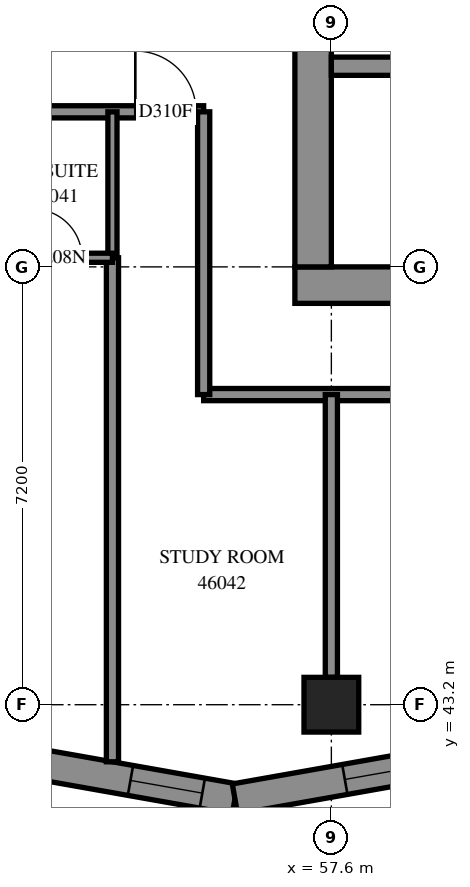
"""IFC4 building model, lengths in metres.
Left out: names, types, materials, properties, quantities, classifications, styles, units other than length and angle.
Written with IfcOpenShell. Run it as: python <this file> out.ifc"""

import sys

from ifc_helpers import new_model, si_unit, direction, frame, frame_2d, origin, origin_2d, place, context, subcontext, project, spatial, polyline, rectangle, outline, extrude, element, fill, save


model = new_model("IFC4")
c1 = context("Model", 3, precision=1e-05, world=origin(), true_north=direction((0.0, 1.0)))
c2 = subcontext(c1, "Body", "Model", "MODEL_VIEW")
j1 = project(units=[si_unit("LENGTHUNIT", "METRE"), si_unit("PLANEANGLEUNIT", "RADIAN")], contexts=[c1])
p1 = place(None, origin())
s1 = spatial("IfcSite", under=j1, at=p1, CompositionType="ELEMENT")
p2 = place(p1, origin())
s2 = spatial("IfcBuilding", under=s1, at=p2, CompositionType="ELEMENT")
p3 = place(p2, frame((0.0, 0.0, 169.4)))
s3 = spatial("IfcBuildingStorey", under=s2, at=p3, CompositionType="ELEMENT", Elevation=169.4)
p4 = place(p3, frame((57.6, 43.2, 0.0), z_axis=(0.0, 0.0, 1.0), x_axis=(1.0, 0.0, 0.0)))
e1 = element("IfcColumn", 1, at=p4, inside=s3, PredefinedType="COLUMN", context=c2, shape_type="SweptSolid", body=[
    extrude(rectangle(XDim=0.9, YDim=0.9, at=origin_2d()), origin(), (0.0, 0.0, 1.0), 3.1),
])
p5 = place(p3, frame((57.0, 50.1, -0.3), z_axis=(0.0, 0.0, 1.0), x_axis=(1.0, 0.0, 0.0)))
e2 = element("IfcWall", 2, at=p5, inside=s3, PredefinedType="SHEAR", context=c2, shape_type="SweptSolid", body=[
    extrude(rectangle(XDim=15.6, YDim=0.6, at=frame_2d((7.8, 0.0))), origin(), (0.0, 0.0, 1.0), 2.7),
])
p6 = place(p3, frame((57.3, 50.4, -0.3), z_axis=(0.0, 0.0, 1.0), x_axis=(0.0, 1.0, 0.0)))
e3 = element("IfcWall", 3, at=p6, inside=s3, PredefinedType="SHEAR", context=c2, shape_type="SweptSolid", body=[
    extrude(rectangle(XDim=14.4, YDim=0.6, at=frame_2d((7.2, 0.0))), origin(), (0.0, 0.0, 1.0), 2.7),
])
p7 = place(p6, frame((4.55, 0.0, 0.3)))
e4 = element("IfcOpeningElement", 4, at=p7, cuts=e3, PredefinedType="OPENING", context=c2, shape_type="SweptSolid", body=[
    extrude(rectangle(XDim=1.1, YDim=2.1, at=frame_2d((0.55, 1.05))), frame((0.0, 0.31, 0.0), z_axis=(0.0, -1.0, 0.0), x_axis=(1.0, 0.0, 0.0)), (0.0, 0.0, 1.0), 0.62),
])
p8 = place(p6, frame((11.35, 0.0, 0.3)))
e5 = element("IfcOpeningElement", 5, at=p8, cuts=e3, PredefinedType="OPENING", context=c2, shape_type="SweptSolid", body=[
    extrude(rectangle(XDim=1.1, YDim=2.1, at=frame_2d((0.55, 1.05))), frame((0.0, 0.31, 0.0), z_axis=(0.0, -1.0, 0.0), x_axis=(1.0, 0.0, 0.0)), (0.0, 0.0, 1.0), 0.62),
])
p9 = place(p3, frame((57.6, 53.7, 0.0), z_axis=(0.0, 0.0, 1.0), x_axis=(1.0, 0.0, 0.0)))
e6 = element("IfcWall", 6, at=p9, inside=s3, PredefinedType="SOLIDWALL", context=c2, shape_type="SweptSolid", body=[
    extrude(rectangle(XDim=14.4, YDim=0.3, at=frame_2d((7.2, 0.0))), origin(), (0.0, 0.0, 1.0), 3.1),
])
p10 = place(p9, frame((1.35, 0.0, 0.0)))
e7 = element("IfcOpeningElement", 7, at=p10, cuts=e6, PredefinedType="OPENING", context=c2, shape_type="SweptSolid", body=[
    extrude(rectangle(XDim=0.9, YDim=2.1, at=frame_2d((0.45, 1.05))), frame((0.0, 0.16, 0.0), z_axis=(0.0, -1.0, 0.0), x_axis=(1.0, 0.0, 0.0)), (0.0, 0.0, 1.0), 0.32),
])
p11 = place(p9, frame((4.95, 0.0, 0.0)))
e8 = element("IfcOpeningElement", 8, at=p11, cuts=e6, PredefinedType="OPENING", context=c2, shape_type="SweptSolid", body=[
    extrude(rectangle(XDim=0.9, YDim=2.1, at=frame_2d((0.45, 1.05))), frame((0.0, 0.16, 0.0), z_axis=(0.0, -1.0, 0.0), x_axis=(1.0, 0.0, 0.0)), (0.0, 0.0, 1.0), 0.32),
])
p12 = place(p9, frame((8.55, 0.0, 0.0)))
e9 = element("IfcOpeningElement", 9, at=p12, cuts=e6, PredefinedType="OPENING", context=c2, shape_type="SweptSolid", body=[
    extrude(rectangle(XDim=0.9, YDim=2.1, at=frame_2d((0.45, 1.05))), frame((0.0, 0.16, 0.0), z_axis=(0.0, -1.0, 0.0), x_axis=(1.0, 0.0, 0.0)), (0.0, 0.0, 1.0), 0.32),
])
p13 = place(p9, frame((12.05, 0.0, 0.0)))
e10 = element("IfcOpeningElement", 10, at=p13, cuts=e6, PredefinedType="OPENING", context=c2, shape_type="SweptSolid", body=[
    extrude(rectangle(XDim=1.1, YDim=2.1, at=frame_2d((0.55, 1.05))), frame((0.0, 0.16, 0.0), z_axis=(0.0, -1.0, 0.0), x_axis=(1.0, 0.0, 0.0)), (0.0, 0.0, 1.0), 0.32),
])
p14 = place(p3, frame((52.586, 42.258, 0.0), z_axis=(0.0, 0.0, 1.0), x_axis=(0.9847004616, -0.1742555624, 0.0)))
e11 = element("IfcWall", 11, at=p14, inside=s3, PredefinedType="SOLIDWALL", context=c2, shape_type="SweptSolid", body=[
    extrude(outline(polyline([(0.066, -0.25), (3.526, -0.25), (3.437, 0.25), (-0.066, 0.25), (0.066, -0.25)])), origin(), (0.0, 0.0, 1.0), 3.1),
])
p15 = place(p14, frame((1.737, 0.0, 0.45)))
e12 = element("IfcOpeningElement", 12, at=p15, cuts=e11, PredefinedType="OPENING", context=c2, shape_type="SweptSolid", body=[
    extrude(rectangle(XDim=1.2, YDim=2.5, at=frame_2d((0.6, 1.25))), frame((0.0, 0.26, 0.0), z_axis=(0.0, -1.0, 0.0), x_axis=(1.0, 0.0, 0.0)), (0.0, 0.0, 1.0), 0.52),
])
p16 = place(p3, frame((56.014, 41.651, 0.0), z_axis=(0.0, 0.0, 1.0), x_axis=(0.9846979018, 0.1742700266, 0.0)))
e13 = element("IfcWall", 13, at=p16, inside=s3, PredefinedType="SOLIDWALL", context=c2, shape_type="SweptSolid", body=[
    extrude(outline(polyline([(-0.044, -0.25), (3.416, -0.25), (3.504, 0.25), (0.044, 0.25), (-0.044, -0.25)])), origin(), (0.0, 0.0, 1.0), 3.1),
])
p17 = place(p16, frame((1.835, 0.0, 0.45)))
e14 = element("IfcOpeningElement", 14, at=p17, cuts=e13, PredefinedType="OPENING", context=c2, shape_type="SweptSolid", body=[
    extrude(rectangle(XDim=1.2, YDim=2.5, at=frame_2d((0.6, 1.25))), frame((0.0, 0.26, 0.0), z_axis=(0.0, -1.0, 0.0), x_axis=(1.0, 0.0, 0.0)), (0.0, 0.0, 1.0), 0.52),
])
p18 = place(p3, frame((55.5, 48.3, 0.0), z_axis=(0.0, 0.0, 1.0), x_axis=(1.0, 0.0, 0.0)))
e15 = element("IfcWall", 15, at=p18, inside=s3, PredefinedType="PARTITIONING", context=c2, shape_type="SweptSolid", body=[
    extrude(rectangle(XDim=18.974, YDim=0.2, at=frame_2d((9.487, 0.0))), origin(), (0.0, 0.0, 1.0), 3.1),
])
p19 = place(p18, frame((5.963, 0.0, 0.0)))
e16 = element("IfcOpeningElement", 16, at=p19, cuts=e15, PredefinedType="OPENING", context=c2, shape_type="SweptSolid", body=[
    extrude(rectangle(XDim=1.0, YDim=2.1, at=frame_2d((0.5, 1.05))), frame((0.0, 0.11, 0.0), z_axis=(0.0, -1.0, 0.0), x_axis=(1.0, 0.0, 0.0)), (0.0, 0.0, 1.0), 0.22),
])
p20 = place(p18, frame((13.161, 0.0, 0.0)))
e17 = element("IfcOpeningElement", 17, at=p20, cuts=e15, PredefinedType="OPENING", context=c2, shape_type="SweptSolid", body=[
    extrude(rectangle(XDim=0.9, YDim=2.1, at=frame_2d((0.45, 1.05))), frame((0.0, 0.11, 0.0), z_axis=(0.0, -1.0, 0.0), x_axis=(1.0, 0.0, 0.0)), (0.0, 0.0, 1.0), 0.22),
])
p21 = place(p3, frame((54.0, 42.261, 0.0), z_axis=(0.0, 0.0, 1.0), x_axis=(0.0, 1.0, 0.0)))
e18 = element("IfcWall", 18, at=p21, inside=s3, PredefinedType="PARTITIONING", context=c2, shape_type="SweptSolid", body=[
    extrude(rectangle(XDim=8.289, YDim=0.2, at=frame_2d((4.144, 0.0))), origin(), (0.0, 0.0, 1.0), 3.1),
])
p22 = place(p3, frame((50.4, 52.95, 0.0), z_axis=(0.0, 0.0, 1.0), x_axis=(1.0, 0.0, 0.0)))
e19 = element("IfcWall", 19, at=p22, inside=s3, PredefinedType="PARTITIONING", context=c2, shape_type="SweptSolid", body=[
    extrude(rectangle(XDim=5.1, YDim=0.2, at=frame_2d((2.55, 0.0))), origin(), (0.0, 0.0, 1.0), 3.1),
])
p23 = place(p22, frame((0.4, 0.0, 0.0)))
e20 = element("IfcOpeningElement", 20, at=p23, cuts=e19, PredefinedType="OPENING", context=c2, shape_type="SweptSolid", body=[
    extrude(rectangle(XDim=0.9, YDim=2.1, at=frame_2d((0.45, 1.05))), frame((0.0, 0.11, 0.0), z_axis=(0.0, -1.0, 0.0), x_axis=(1.0, 0.0, 0.0)), (0.0, 0.0, 1.0), 0.22),
])
p24 = place(p22, frame((3.976, 0.0, 0.0)))
e21 = element("IfcOpeningElement", 21, at=p24, cuts=e19, PredefinedType="OPENING", context=c2, shape_type="SweptSolid", body=[
    extrude(rectangle(XDim=1.0, YDim=2.1, at=frame_2d((0.5, 1.05))), frame((0.0, 0.11, 0.0), z_axis=(0.0, -1.0, 0.0), x_axis=(1.0, 0.0, 0.0)), (0.0, 0.0, 1.0), 0.22),
])
for number, where, z_axis, x_axis in (
    (22, (55.5, 48.3, 0.0), (0.0, 0.0, 1.0), (0.0, 1.0, 0.0)),
    (23, (57.6, 43.65, 0.0), (0.0, 0.0, 1.0), (0.0, 1.0, 0.0)),
):
    element("IfcWall", number, at=place(p3, frame(where, z_axis=z_axis, x_axis=x_axis)), inside=s3, PredefinedType="PARTITIONING", context=c2, shape_type="SweptSolid", body=[
        extrude(rectangle(XDim=4.65, YDim=0.2, at=frame_2d((2.325, 0.0))), origin(), (0.0, 0.0, 1.0), 3.1),
    ])
p25 = place(p3, frame((54.0, 50.55, 0.0), z_axis=(0.0, 0.0, 1.0), x_axis=(0.0, 1.0, 0.0)))
e24 = element("IfcWall", 24, at=p25, inside=s3, PredefinedType="PARTITIONING", context=c2, shape_type="SweptSolid", body=[
    extrude(rectangle(XDim=2.4, YDim=0.15, at=frame_2d((1.2, 0.0))), origin(), (0.0, 0.0, 1.0), 3.1),
])
p26 = place(p3, frame((52.1, 50.55, 0.0), z_axis=(0.0, 0.0, 1.0), x_axis=(1.0, 0.0, 0.0)))
e25 = element("IfcWall", 25, at=p26, inside=s3, PredefinedType="PARTITIONING", context=c2, shape_type="SweptSolid", body=[
    extrude(rectangle(XDim=1.9, YDim=0.15, at=frame_2d((0.95, 0.0))), origin(), (0.0, 0.0, 1.0), 3.1),
])
p27 = place(p26, frame((0.598, 0.0, 0.0)))
e26 = element("IfcOpeningElement", 26, at=p27, cuts=e25, PredefinedType="OPENING", context=c2, shape_type="SweptSolid", body=[
    extrude(rectangle(XDim=0.8, YDim=2.1, at=frame_2d((0.4, 1.05))), frame((0.0, 0.085, 0.0), z_axis=(0.0, -1.0, 0.0), x_axis=(1.0, 0.0, 0.0)), (0.0, 0.0, 1.0), 0.17),
])
p28 = place(p15, origin())
e27 = element("IfcWindow", 27, at=p28, inside=s3, PartitioningType="SINGLE_PANEL", PredefinedType="WINDOW", context=c2, shape_type="SweptSolid", body=[
    extrude(rectangle(XDim=1.2, YDim=2.5, at=frame_2d((0.6, 1.25))), frame((0.0, 0.18, 0.0), z_axis=(0.0, -1.0, 0.0), x_axis=(1.0, 0.0, 0.0)), (0.0, 0.0, 1.0), 0.06),
])
fill(e12, e27)
p29 = place(p17, origin())
e28 = element("IfcWindow", 28, at=p29, inside=s3, PartitioningType="SINGLE_PANEL", PredefinedType="WINDOW", context=c2, shape_type="SweptSolid", body=[
    extrude(rectangle(XDim=1.2, YDim=2.5, at=frame_2d((0.6, 1.25))), frame((0.0, 0.18, 0.0), z_axis=(0.0, -1.0, 0.0), x_axis=(1.0, 0.0, 0.0)), (0.0, 0.0, 1.0), 0.06),
])
fill(e14, e28)
p30 = place(p27, origin())
e29 = element("IfcDoor", 29, at=p30, inside=s3, OperationType="SINGLE_SWING_RIGHT", PredefinedType="DOOR", context=c2, shape_type="SweptSolid", body=[
    extrude(rectangle(XDim=0.8, YDim=2.1, at=frame_2d((0.4, 1.05))), frame((0.0, 0.025, 0.0), z_axis=(0.0, -1.0, 0.0), x_axis=(1.0, 0.0, 0.0)), (0.0, 0.0, 1.0), 0.05),
])
fill(e26, e29)
p31 = place(p24, origin())
e30 = element("IfcDoor", 30, at=p31, inside=s3, OperationType="SINGLE_SWING_RIGHT", PredefinedType="DOOR", context=c2, shape_type="SweptSolid", body=[
    extrude(rectangle(XDim=1.0, YDim=2.1, at=frame_2d((0.5, 1.05))), frame((0.0, 0.025, 0.0), z_axis=(0.0, -1.0, 0.0), x_axis=(1.0, 0.0, 0.0)), (0.0, 0.0, 1.0), 0.05),
])
fill(e21, e30)
save(model, sys.argv[1])
